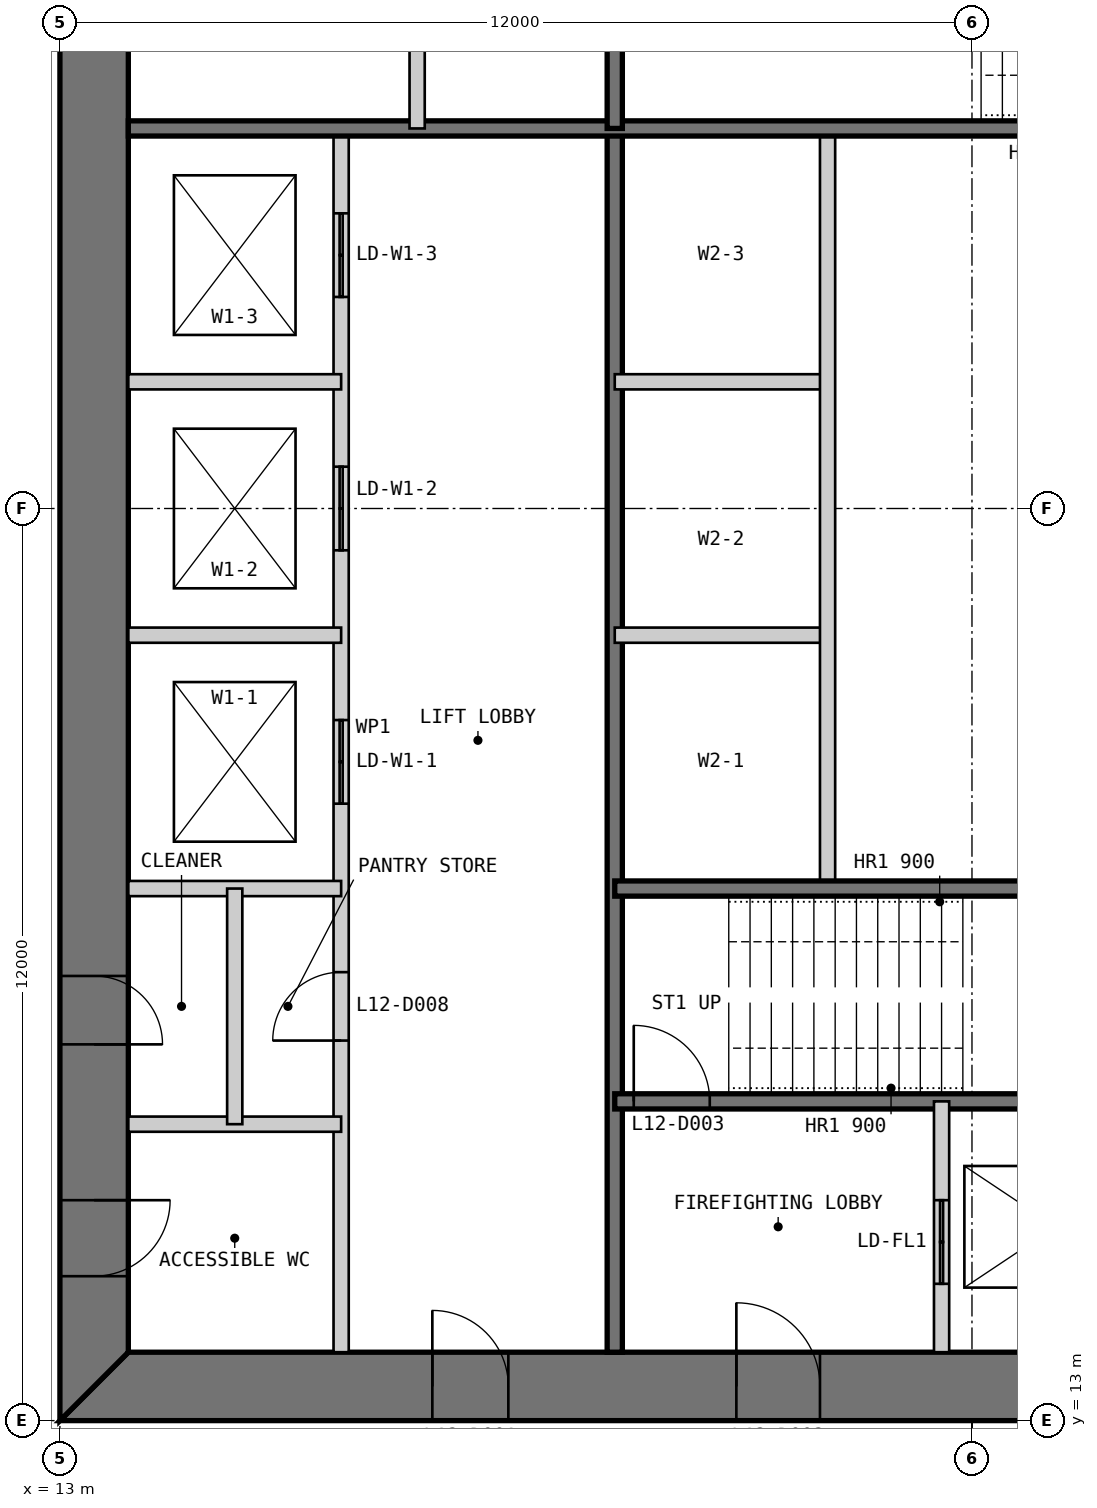
"""IFC4 building model, lengths in metres.
Left out: names, types, materials, properties, quantities, classifications, styles, units other than length and angle.
Written with IfcOpenShell. Run it as: python <this file> out.ifc"""

import sys

from ifc_helpers import new_model, si_unit, direction, frame, frame_2d, origin, place, context, subcontext, project, spatial, polyline, rectangle, outline, extrude, element, fill, save


model = new_model("IFC4")
c1 = context("Model", 3, precision=1e-05, world=origin(), true_north=direction((0.0, 1.0)))
c2 = subcontext(c1, "Body", "Model", "MODEL_VIEW")
j1 = project(units=[si_unit("LENGTHUNIT", "METRE"), si_unit("PLANEANGLEUNIT", "RADIAN")], contexts=[c1])
p1 = place(None, origin())
s1 = spatial("IfcSite", under=j1, at=p1, CompositionType="ELEMENT")
p2 = place(p1, origin())
s2 = spatial("IfcBuilding", under=s1, at=p2, CompositionType="ELEMENT")
p3 = place(p2, frame((0.0, 0.0, 55.0)))
s3 = spatial("IfcBuildingStorey", under=s2, at=p3, CompositionType="ELEMENT", Elevation=55.0)
p4 = place(p3, frame((13.0, 13.45, 0.0), z_axis=(0.0, 0.0, 1.0), x_axis=(1.0, 0.0, 0.0)))
e1 = element("IfcWall", 1, at=p4, inside=s3, PredefinedType="SHEAR", context=c2, shape_type="SweptSolid", body=[
    extrude(outline(polyline([(0.0, -0.45), (24.0, -0.45), (23.1, 0.45), (0.9, 0.45), (0.0, -0.45)])), origin(), (0.0, 0.0, 1.0), 4.0),
])
p5 = place(p4, frame((4.9, 0.0, 0.0)))
e2 = element("IfcOpeningElement", 2, at=p5, cuts=e1, PredefinedType="OPENING", context=c2, shape_type="SweptSolid", body=[
    extrude(rectangle(XDim=1.0, YDim=2.2, at=frame_2d((0.5, 1.1))), frame((0.0, 0.46, 0.0), z_axis=(0.0, -1.0, 0.0), x_axis=(1.0, 0.0, 0.0)), (0.0, 0.0, 1.0), 0.92),
])
p6 = place(p4, frame((8.9, 0.0, 0.0)))
e3 = element("IfcOpeningElement", 3, at=p6, cuts=e1, PredefinedType="OPENING", context=c2, shape_type="SweptSolid", body=[
    extrude(rectangle(XDim=1.1, YDim=2.2, at=frame_2d((0.55, 1.1))), frame((0.0, 0.46, 0.0), z_axis=(0.0, -1.0, 0.0), x_axis=(1.0, 0.0, 0.0)), (0.0, 0.0, 1.0), 0.92),
])
p7 = place(p4, frame((15.05, 0.0, 0.0)))
e4 = element("IfcOpeningElement", 4, at=p7, cuts=e1, PredefinedType="OPENING", context=c2, shape_type="SweptSolid", body=[
    extrude(rectangle(XDim=0.9, YDim=2.2, at=frame_2d((0.45, 1.1))), frame((0.0, 0.46, 0.0), z_axis=(0.0, -1.0, 0.0), x_axis=(1.0, 0.0, 0.0)), (0.0, 0.0, 1.0), 0.92),
])
p8 = place(p4, frame((17.9, 0.0, 0.0)))
e5 = element("IfcOpeningElement", 5, at=p8, cuts=e1, PredefinedType="OPENING", context=c2, shape_type="SweptSolid", body=[
    extrude(rectangle(XDim=1.0, YDim=2.2, at=frame_2d((0.5, 1.1))), frame((0.0, 0.46, 0.0), z_axis=(0.0, -1.0, 0.0), x_axis=(1.0, 0.0, 0.0)), (0.0, 0.0, 1.0), 0.92),
])
p9 = place(p4, frame((21.4, 0.0, 0.0)))
e6 = element("IfcOpeningElement", 6, at=p9, cuts=e1, PredefinedType="OPENING", context=c2, shape_type="SweptSolid", body=[
    extrude(rectangle(XDim=1.0, YDim=2.2, at=frame_2d((0.5, 1.1))), frame((0.0, 0.46, 0.0), z_axis=(0.0, -1.0, 0.0), x_axis=(1.0, 0.0, 0.0)), (0.0, 0.0, 1.0), 0.92),
])
p10 = place(p3, frame((13.45, 36.1, 0.0), z_axis=(0.0, 0.0, 1.0), x_axis=(0.0, -1.0, 0.0)))
e7 = element("IfcWall", 7, at=p10, inside=s3, PredefinedType="SHEAR", context=c2, shape_type="SweptSolid", body=[
    extrude(outline(polyline([(-0.9, -0.45), (23.1, -0.45), (22.2, 0.45), (0.0, 0.45), (-0.9, -0.45)])), origin(), (0.0, 0.0, 1.0), 4.0),
])
p11 = place(p10, frame((20.2, 0.0, 0.0)))
e8 = element("IfcOpeningElement", 8, at=p11, cuts=e7, PredefinedType="OPENING", context=c2, shape_type="SweptSolid", body=[
    extrude(rectangle(XDim=1.0, YDim=2.2, at=frame_2d((0.5, 1.1))), frame((0.0, 0.46, 0.0), z_axis=(0.0, -1.0, 0.0), x_axis=(1.0, 0.0, 0.0)), (0.0, 0.0, 1.0), 0.92),
])
p12 = place(p10, frame((17.25, 0.0, 0.0)))
e9 = element("IfcOpeningElement", 9, at=p12, cuts=e7, PredefinedType="OPENING", context=c2, shape_type="SweptSolid", body=[
    extrude(rectangle(XDim=0.9, YDim=2.2, at=frame_2d((0.45, 1.1))), frame((0.0, 0.46, 0.0), z_axis=(0.0, -1.0, 0.0), x_axis=(1.0, 0.0, 0.0)), (0.0, 0.0, 1.0), 0.92),
])
p13 = place(p3, frame((16.7, 13.9, 0.0), z_axis=(0.0, 0.0, 1.0), x_axis=(0.0, 1.0, 0.0)))
e10 = element("IfcWall", 10, at=p13, inside=s3, PredefinedType="PARTITIONING", context=c2, shape_type="SweptSolid", body=[
    extrude(rectangle(XDim=16.1, YDim=0.2, at=frame_2d((8.05, 0.0))), origin(), (0.0, 0.0, 1.0), 3.8),
])
p14 = place(p13, frame((4.1, 0.0, 0.0)))
e11 = element("IfcOpeningElement", 11, at=p14, cuts=e10, PredefinedType="OPENING", context=c2, shape_type="SweptSolid", body=[
    extrude(rectangle(XDim=0.9, YDim=2.2, at=frame_2d((0.45, 1.1))), frame((0.0, 0.11, 0.0), z_axis=(0.0, -1.0, 0.0), x_axis=(1.0, 0.0, 0.0)), (0.0, 0.0, 1.0), 0.22),
])
p15 = place(p13, frame((7.217, 0.0, 0.0)))
e12 = element("IfcOpeningElement", 12, at=p15, cuts=e10, PredefinedType="OPENING", context=c2, shape_type="SweptSolid", body=[
    extrude(rectangle(XDim=1.1, YDim=2.2, at=frame_2d((0.55, 1.1))), frame((0.0, 0.11, 0.0), z_axis=(0.0, -1.0, 0.0), x_axis=(1.0, 0.0, 0.0)), (0.0, 0.0, 1.0), 0.22),
])
p16 = place(p13, frame((10.55, 0.0, 0.0)))
e13 = element("IfcOpeningElement", 13, at=p16, cuts=e10, PredefinedType="OPENING", context=c2, shape_type="SweptSolid", body=[
    extrude(rectangle(XDim=1.1, YDim=2.2, at=frame_2d((0.55, 1.1))), frame((0.0, 0.11, 0.0), z_axis=(0.0, -1.0, 0.0), x_axis=(1.0, 0.0, 0.0)), (0.0, 0.0, 1.0), 0.22),
])
p17 = place(p13, frame((13.883, 0.0, 0.0)))
e14 = element("IfcOpeningElement", 14, at=p17, cuts=e10, PredefinedType="OPENING", context=c2, shape_type="SweptSolid", body=[
    extrude(rectangle(XDim=1.1, YDim=2.2, at=frame_2d((0.55, 1.1))), frame((0.0, 0.11, 0.0), z_axis=(0.0, -1.0, 0.0), x_axis=(1.0, 0.0, 0.0)), (0.0, 0.0, 1.0), 0.22),
])
p18 = place(p3, frame((20.3, 13.9, 0.0), z_axis=(0.0, 0.0, 1.0), x_axis=(0.0, 1.0, 0.0)))
e15 = element("IfcWall", 15, at=p18, inside=s3, PredefinedType="SOLIDWALL", context=c2, shape_type="SweptSolid", body=[
    extrude(rectangle(XDim=16.1, YDim=0.2, at=frame_2d((8.05, 0.0))), origin(), (0.0, 0.0, 1.0), 3.8),
])
for number, where, z_axis, x_axis in (
    (16, (13.9, 20.0, 0.0), (0.0, 0.0, 1.0), (1.0, 0.0, 0.0)),
    (17, (13.9, 23.333, 0.0), (0.0, 0.0, 1.0), (1.0, 0.0, 0.0)),
    (18, (13.9, 26.667, 0.0), (0.0, 0.0, 1.0), (1.0, 0.0, 0.0)),
    (19, (20.3, 23.333, 0.0), (0.0, 0.0, 1.0), (1.0, 0.0, 0.0)),
    (20, (20.3, 26.667, 0.0), (0.0, 0.0, 1.0), (1.0, 0.0, 0.0)),
):
    element("IfcWall", number, at=place(p3, frame(where, z_axis=z_axis, x_axis=x_axis)), inside=s3, PredefinedType="PARTITIONING", context=c2, shape_type="SweptSolid", body=[
        extrude(rectangle(XDim=2.8, YDim=0.2, at=frame_2d((1.4, 0.0))), origin(), (0.0, 0.0, 1.0), 3.8),
    ])
p19 = place(p3, frame((23.1, 20.0, 0.0), z_axis=(0.0, 0.0, 1.0), x_axis=(0.0, 1.0, 0.0)))
e21 = element("IfcWall", 21, at=p19, inside=s3, PredefinedType="PARTITIONING", context=c2, shape_type="SweptSolid", body=[
    extrude(rectangle(XDim=10.0, YDim=0.2, at=frame_2d((5.0, 0.0))), origin(), (0.0, 0.0, 1.0), 3.8),
])
p20 = place(p3, frame((20.3, 17.2, 0.0), z_axis=(0.0, 0.0, 1.0), x_axis=(1.0, 0.0, 0.0)))
e22 = element("IfcWall", 22, at=p20, inside=s3, PredefinedType="SOLIDWALL", context=c2, shape_type="SweptSolid", body=[
    extrude(rectangle(XDim=9.4, YDim=0.2, at=frame_2d((4.7, 0.0))), origin(), (0.0, 0.0, 1.0), 3.8),
])
p21 = place(p20, frame((0.25, 0.0, 0.0)))
e23 = element("IfcOpeningElement", 23, at=p21, cuts=e22, PredefinedType="OPENING", context=c2, shape_type="SweptSolid", body=[
    extrude(rectangle(XDim=1.0, YDim=2.2, at=frame_2d((0.5, 1.1))), frame((0.0, 0.11, 0.0), z_axis=(0.0, -1.0, 0.0), x_axis=(1.0, 0.0, 0.0)), (0.0, 0.0, 1.0), 0.22),
])
p22 = place(p3, frame((20.3, 20.0, 0.0), z_axis=(0.0, 0.0, 1.0), x_axis=(1.0, 0.0, 0.0)))
e24 = element("IfcWall", 24, at=p22, inside=s3, PredefinedType="SOLIDWALL", context=c2, shape_type="SweptSolid", body=[
    extrude(rectangle(XDim=15.8, YDim=0.2, at=frame_2d((7.9, 0.0))), origin(), (0.0, 0.0, 1.0), 3.8),
])
p23 = place(p3, frame((24.6, 13.9, 0.0), z_axis=(0.0, 0.0, 1.0), x_axis=(0.0, 1.0, 0.0)))
e25 = element("IfcWall", 25, at=p23, inside=s3, PredefinedType="PARTITIONING", context=c2, shape_type="SweptSolid", body=[
    extrude(rectangle(XDim=3.3, YDim=0.2, at=frame_2d((1.65, 0.0))), origin(), (0.0, 0.0, 1.0), 3.8),
])
p24 = place(p23, frame((0.9, 0.0, 0.0)))
e26 = element("IfcOpeningElement", 26, at=p24, cuts=e25, PredefinedType="OPENING", context=c2, shape_type="SweptSolid", body=[
    extrude(rectangle(XDim=1.1, YDim=2.2, at=frame_2d((0.55, 1.1))), frame((0.0, 0.11, 0.0), z_axis=(0.0, -1.0, 0.0), x_axis=(1.0, 0.0, 0.0)), (0.0, 0.0, 1.0), 0.22),
])
p25 = place(p3, frame((13.9, 16.9, 0.0), z_axis=(0.0, 0.0, 1.0), x_axis=(1.0, 0.0, 0.0)))
e27 = element("IfcWall", 27, at=p25, inside=s3, PredefinedType="PARTITIONING", context=c2, shape_type="SweptSolid", body=[
    extrude(rectangle(XDim=2.8, YDim=0.2, at=frame_2d((1.4, 0.0))), origin(), (0.0, 0.0, 1.0), 3.8),
])
p26 = place(p3, frame((15.3, 16.9, 0.0), z_axis=(0.0, 0.0, 1.0), x_axis=(0.0, 1.0, 0.0)))
e28 = element("IfcWall", 28, at=p26, inside=s3, PredefinedType="PARTITIONING", context=c2, shape_type="SweptSolid", body=[
    extrude(rectangle(XDim=3.1, YDim=0.2, at=frame_2d((1.55, 0.0))), origin(), (0.0, 0.0, 1.0), 3.8),
])
p27 = place(p3, frame((29.7, 30.0, 0.0), z_axis=(0.0, 0.0, 1.0), x_axis=(-1.0, 0.0, 0.0)))
e29 = element("IfcWall", 29, at=p27, inside=s3, PredefinedType="SOLIDWALL", context=c2, shape_type="SweptSolid", body=[
    extrude(rectangle(XDim=15.8, YDim=0.2, at=frame_2d((7.9, 0.0))), origin(), (0.0, 0.0, 1.0), 3.8),
])
p28 = place(p3, frame((20.3, 36.1, 0.0), z_axis=(0.0, 0.0, 1.0), x_axis=(0.0, -1.0, 0.0)))
e30 = element("IfcWall", 30, at=p28, inside=s3, PredefinedType="SOLIDWALL", context=c2, shape_type="SweptSolid", body=[
    extrude(rectangle(XDim=6.1, YDim=0.2, at=frame_2d((3.05, 0.0))), origin(), (0.0, 0.0, 1.0), 3.8),
])
p29 = place(p3, frame((17.7, 36.1, 0.0), z_axis=(0.0, 0.0, 1.0), x_axis=(0.0, -1.0, 0.0)))
e31 = element("IfcWall", 31, at=p29, inside=s3, PredefinedType="PARTITIONING", context=c2, shape_type="SweptSolid", body=[
    extrude(rectangle(XDim=6.1, YDim=0.2, at=frame_2d((3.05, 0.0))), origin(), (0.0, 0.0, 1.0), 3.8),
])
p30 = place(p5, origin())
e32 = element("IfcDoor", 32, at=p30, inside=s3, OperationType="SINGLE_SWING_LEFT", PredefinedType="DOOR", context=c2, shape_type="SweptSolid", body=[
    extrude(rectangle(XDim=1.0, YDim=2.2, at=frame_2d((0.5, 1.1))), frame((0.0, 0.025, 0.0), z_axis=(0.0, -1.0, 0.0), x_axis=(1.0, 0.0, 0.0)), (0.0, 0.0, 1.0), 0.05),
    extrude(outline(polyline([(0.0, 0.0), (0.04, 0.0), (0.04, 2.16), (0.96, 2.16), (0.96, 0.0), (1.0, 0.0), (1.0, 2.2), (0.0, 2.2), (0.0, 0.0)])), frame((0.0, 0.3, 0.0), z_axis=(0.0, -1.0, 0.0), x_axis=(1.0, 0.0, 0.0)), (0.0, 0.0, 1.0), 0.6),
])
fill(e2, e32)
p31 = place(p6, origin())
e33 = element("IfcDoor", 33, at=p31, inside=s3, OperationType="SINGLE_SWING_LEFT", PredefinedType="DOOR", context=c2, shape_type="SweptSolid", body=[
    extrude(rectangle(XDim=1.1, YDim=2.2, at=frame_2d((0.55, 1.1))), frame((0.0, 0.025, 0.0), z_axis=(0.0, -1.0, 0.0), x_axis=(1.0, 0.0, 0.0)), (0.0, 0.0, 1.0), 0.05),
    extrude(outline(polyline([(0.0, 0.0), (0.04, 0.0), (0.04, 2.16), (1.06, 2.16), (1.06, 0.0), (1.1, 0.0), (1.1, 2.2), (0.0, 2.2), (0.0, 0.0)])), frame((0.0, 0.3, 0.0), z_axis=(0.0, -1.0, 0.0), x_axis=(1.0, 0.0, 0.0)), (0.0, 0.0, 1.0), 0.6),
])
fill(e3, e33)
p32 = place(p21, origin())
e34 = element("IfcDoor", 34, at=p32, inside=s3, OperationType="SINGLE_SWING_LEFT", PredefinedType="DOOR", context=c2, shape_type="SweptSolid", body=[
    extrude(rectangle(XDim=1.0, YDim=2.2, at=frame_2d((0.5, 1.1))), frame((0.0, 0.025, 0.0), z_axis=(0.0, -1.0, 0.0), x_axis=(1.0, 0.0, 0.0)), (0.0, 0.0, 1.0), 0.05),
])
fill(e23, e34)
p33 = place(p11, origin())
e35 = element("IfcDoor", 35, at=p33, inside=s3, OperationType="SINGLE_SWING_LEFT", PredefinedType="DOOR", context=c2, shape_type="SweptSolid", body=[
    extrude(rectangle(XDim=1.0, YDim=2.2, at=frame_2d((0.5, 1.1))), frame((0.0, 0.025, 0.0), z_axis=(0.0, -1.0, 0.0), x_axis=(1.0, 0.0, 0.0)), (0.0, 0.0, 1.0), 0.05),
    extrude(outline(polyline([(0.0, 0.0), (0.04, 0.0), (0.04, 2.16), (0.96, 2.16), (0.96, 0.0), (1.0, 0.0), (1.0, 2.2), (0.0, 2.2), (0.0, 0.0)])), frame((0.0, 0.3, 0.0), z_axis=(0.0, -1.0, 0.0), x_axis=(1.0, 0.0, 0.0)), (0.0, 0.0, 1.0), 0.6),
])
fill(e8, e35)
p34 = place(p14, origin())
e36 = element("IfcDoor", 36, at=p34, inside=s3, OperationType="SINGLE_SWING_LEFT", PredefinedType="DOOR", context=c2, shape_type="SweptSolid", body=[
    extrude(rectangle(XDim=0.9, YDim=2.2, at=frame_2d((0.45, 1.1))), frame((0.0, 0.025, 0.0), z_axis=(0.0, -1.0, 0.0), x_axis=(1.0, 0.0, 0.0)), (0.0, 0.0, 1.0), 0.05),
])
fill(e11, e36)
p35 = place(p12, origin())
e37 = element("IfcDoor", 37, at=p35, inside=s3, OperationType="SINGLE_SWING_RIGHT", PredefinedType="DOOR", context=c2, shape_type="SweptSolid", body=[
    extrude(rectangle(XDim=0.9, YDim=2.2, at=frame_2d((0.45, 1.1))), frame((0.0, 0.025, 0.0), z_axis=(0.0, -1.0, 0.0), x_axis=(1.0, 0.0, 0.0)), (0.0, 0.0, 1.0), 0.05),
    extrude(outline(polyline([(0.0, 0.0), (0.04, 0.0), (0.04, 2.16), (0.86, 2.16), (0.86, 0.0), (0.9, 0.0), (0.9, 2.2), (0.0, 2.2), (0.0, 0.0)])), frame((0.0, 0.3, 0.0), z_axis=(0.0, -1.0, 0.0), x_axis=(1.0, 0.0, 0.0)), (0.0, 0.0, 1.0), 0.6),
])
fill(e9, e37)
p36 = place(p24, origin())
e38 = element("IfcDoor", 38, at=p36, inside=s3, OperationType="DOUBLE_DOOR_SLIDING", PredefinedType="DOOR", context=c2, shape_type="SweptSolid", body=[
    extrude(rectangle(XDim=1.1, YDim=2.2, at=frame_2d((0.55, 1.1))), frame((0.0, 0.025, 0.0), z_axis=(0.0, -1.0, 0.0), x_axis=(1.0, 0.0, 0.0)), (0.0, 0.0, 1.0), 0.05),
])
fill(e26, e38)
p37 = place(p15, origin())
e39 = element("IfcDoor", 39, at=p37, inside=s3, OperationType="DOUBLE_DOOR_SLIDING", PredefinedType="DOOR", context=c2, shape_type="SweptSolid", body=[
    extrude(rectangle(XDim=1.1, YDim=2.2, at=frame_2d((0.55, 1.1))), frame((0.0, 0.025, 0.0), z_axis=(0.0, -1.0, 0.0), x_axis=(1.0, 0.0, 0.0)), (0.0, 0.0, 1.0), 0.05),
])
fill(e12, e39)
p38 = place(p16, origin())
e40 = element("IfcDoor", 40, at=p38, inside=s3, OperationType="DOUBLE_DOOR_SLIDING", PredefinedType="DOOR", context=c2, shape_type="SweptSolid", body=[
    extrude(rectangle(XDim=1.1, YDim=2.2, at=frame_2d((0.55, 1.1))), frame((0.0, 0.025, 0.0), z_axis=(0.0, -1.0, 0.0), x_axis=(1.0, 0.0, 0.0)), (0.0, 0.0, 1.0), 0.05),
])
fill(e13, e40)
p39 = place(p17, origin())
e41 = element("IfcDoor", 41, at=p39, inside=s3, OperationType="DOUBLE_DOOR_SLIDING", PredefinedType="DOOR", context=c2, shape_type="SweptSolid", body=[
    extrude(rectangle(XDim=1.1, YDim=2.2, at=frame_2d((0.55, 1.1))), frame((0.0, 0.025, 0.0), z_axis=(0.0, -1.0, 0.0), x_axis=(1.0, 0.0, 0.0)), (0.0, 0.0, 1.0), 0.05),
])
fill(e14, e41)
save(model, sys.argv[1])
